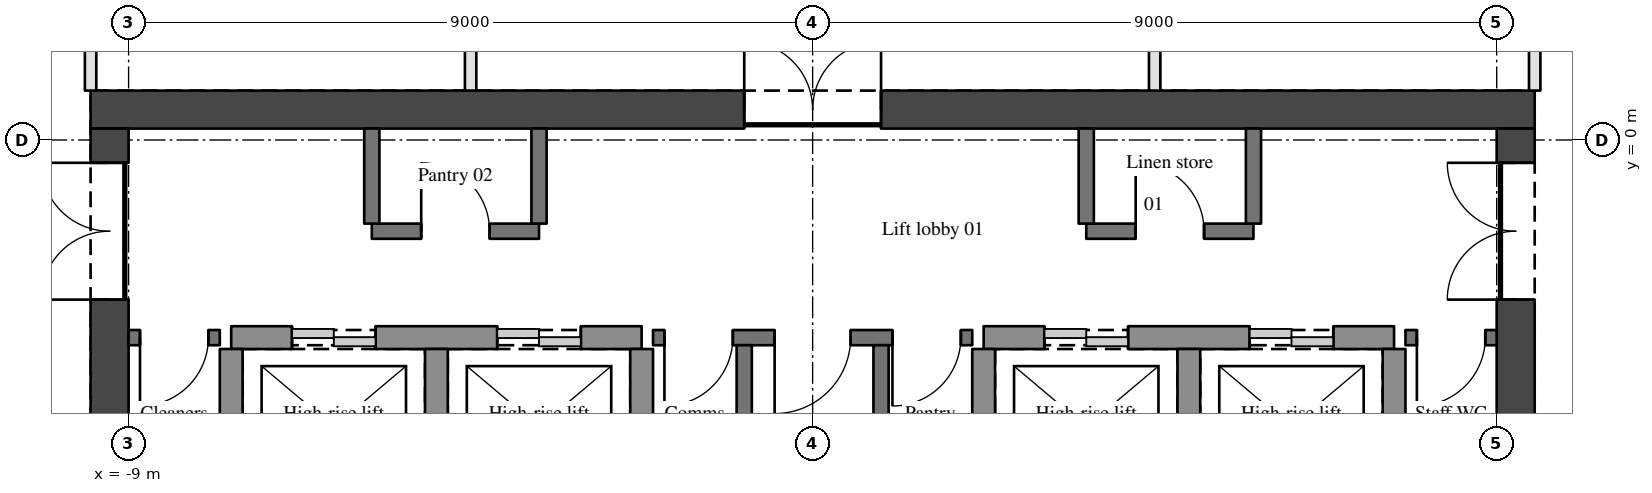
"""IFC4 building model, lengths in metres.
Left out: names, types, materials, properties, quantities, classifications, styles, units other than length and angle.
Written with IfcOpenShell. Run it as: python <this file> out.ifc"""

import sys

from ifc_helpers import new_model, si_unit, direction, frame, frame_2d, origin, place, context, subcontext, project, spatial, rectangle, extrude, element, fill, save


model = new_model("IFC4")
c1 = context("Model", 3, precision=1e-05, world=origin(), true_north=direction((0.0, 1.0)))
c2 = subcontext(c1, "Body", "Model", "MODEL_VIEW")
j1 = project(units=[si_unit("LENGTHUNIT", "METRE"), si_unit("PLANEANGLEUNIT", "RADIAN")], contexts=[c1])
p1 = place(None, origin())
s1 = spatial("IfcSite", under=j1, at=p1, CompositionType="ELEMENT")
p2 = place(p1, origin())
s2 = spatial("IfcBuilding", under=s1, at=p2, CompositionType="ELEMENT")
p3 = place(p2, frame((0.0, 0.0, 172.2)))
s3 = spatial("IfcBuildingStorey", under=s2, at=p3, CompositionType="ELEMENT", Elevation=172.2)
p4 = place(p3, frame((-9.5, 0.4, 0.0), z_axis=(0.0, 0.0, 1.0), x_axis=(1.0, 0.0, 0.0)))
e1 = element("IfcWall", 1, at=p4, inside=s3, PredefinedType="SHEAR", context=c2, shape_type="SweptSolid", body=[
    extrude(rectangle(XDim=19.0, YDim=0.5, at=frame_2d((9.5, 0.0))), origin(), (0.0, 0.0, 1.0), 3.15),
])
p5 = place(p4, frame((8.6, 0.0, 0.0)))
e2 = element("IfcOpeningElement", 2, at=p5, cuts=e1, PredefinedType="OPENING", context=c2, shape_type="SweptSolid", body=[
    extrude(rectangle(XDim=1.8, YDim=2.1, at=frame_2d((0.9, 1.05))), frame((0.0, 0.26, 0.0), z_axis=(0.0, -1.0, 0.0), x_axis=(1.0, 0.0, 0.0)), (0.0, 0.0, 1.0), 0.52),
])
p6 = place(p3, frame((-9.25, -11.5, 0.0), z_axis=(0.0, 0.0, 1.0), x_axis=(0.0, 1.0, 0.0)))
e3 = element("IfcWall", 3, at=p6, inside=s3, PredefinedType="SHEAR", context=c2, shape_type="SweptSolid", body=[
    extrude(rectangle(XDim=11.65, YDim=0.5, at=frame_2d((5.825, 0.0))), origin(), (0.0, 0.0, 1.0), 3.15),
])
p7 = place(p6, frame((9.4, 0.0, 0.0)))
e4 = element("IfcOpeningElement", 4, at=p7, cuts=e3, PredefinedType="OPENING", context=c2, shape_type="SweptSolid", body=[
    extrude(rectangle(XDim=1.8, YDim=2.1, at=frame_2d((0.9, 1.05))), frame((0.0, 0.26, 0.0), z_axis=(0.0, -1.0, 0.0), x_axis=(1.0, 0.0, 0.0)), (0.0, 0.0, 1.0), 0.52),
])
p8 = place(p3, frame((9.25, -11.5, 0.0), z_axis=(0.0, 0.0, 1.0), x_axis=(0.0, 1.0, 0.0)))
e5 = element("IfcWall", 5, at=p8, inside=s3, PredefinedType="SHEAR", context=c2, shape_type="SweptSolid", body=[
    extrude(rectangle(XDim=11.65, YDim=0.5, at=frame_2d((5.825, 0.0))), origin(), (0.0, 0.0, 1.0), 3.15),
])
p9 = place(p8, frame((9.4, 0.0, 0.0)))
e6 = element("IfcOpeningElement", 6, at=p9, cuts=e5, PredefinedType="OPENING", context=c2, shape_type="SweptSolid", body=[
    extrude(rectangle(XDim=1.8, YDim=2.1, at=frame_2d((0.9, 1.05))), frame((0.0, 0.26, 0.0), z_axis=(0.0, -1.0, 0.0), x_axis=(1.0, 0.0, 0.0)), (0.0, 0.0, 1.0), 0.52),
])
p10 = place(p3, frame((-7.8, -2.6, 0.0), z_axis=(0.0, 0.0, 1.0), x_axis=(-1.0, 0.0, 0.0)))
e7 = element("IfcWall", 7, at=p10, inside=s3, PredefinedType="SOLIDWALL", context=c2, shape_type="SweptSolid", body=[
    extrude(rectangle(XDim=1.2, YDim=0.2, at=frame_2d((0.6, 0.0))), origin(), (0.0, 0.0, 1.0), 2.85),
])
p11 = place(p10, frame((0.15, 0.0, 0.0)))
e8 = element("IfcOpeningElement", 8, at=p11, cuts=e7, PredefinedType="OPENING", context=c2, shape_type="SweptSolid", body=[
    extrude(rectangle(XDim=0.9, YDim=2.1, at=frame_2d((0.45, 1.05))), frame((0.0, 0.11, 0.0), z_axis=(0.0, -1.0, 0.0), x_axis=(1.0, 0.0, 0.0)), (0.0, 0.0, 1.0), 0.22),
])
p12 = place(p3, frame((-7.65, -2.6, 0.0), z_axis=(0.0, 0.0, 1.0), x_axis=(1.0, 0.0, 0.0)))
e9 = element("IfcWall", 9, at=p12, inside=s3, PredefinedType="SHEAR", context=c2, shape_type="SweptSolid", body=[
    extrude(rectangle(XDim=5.4, YDim=0.3, at=frame_2d((2.7, 0.0))), origin(), (0.0, 0.0, 1.0), 3.15),
])
p13 = place(p12, frame((0.8, 0.0, 0.0)))
e10 = element("IfcOpeningElement", 10, at=p13, cuts=e9, PredefinedType="OPENING", context=c2, shape_type="SweptSolid", body=[
    extrude(rectangle(XDim=1.1, YDim=2.1, at=frame_2d((0.55, 1.05))), frame((0.0, 0.16, 0.0), z_axis=(0.0, -1.0, 0.0), x_axis=(1.0, 0.0, 0.0)), (0.0, 0.0, 1.0), 0.32),
])
p14 = place(p12, frame((3.5, 0.0, 0.0)))
e11 = element("IfcOpeningElement", 11, at=p14, cuts=e9, PredefinedType="OPENING", context=c2, shape_type="SweptSolid", body=[
    extrude(rectangle(XDim=1.1, YDim=2.1, at=frame_2d((0.55, 1.05))), frame((0.0, 0.16, 0.0), z_axis=(0.0, -1.0, 0.0), x_axis=(1.0, 0.0, 0.0)), (0.0, 0.0, 1.0), 0.32),
])
p15 = place(p3, frame((2.1, -2.6, 0.0), z_axis=(0.0, 0.0, 1.0), x_axis=(-1.0, 0.0, 0.0)))
e12 = element("IfcWall", 12, at=p15, inside=s3, PredefinedType="SOLIDWALL", context=c2, shape_type="SweptSolid", body=[
    extrude(rectangle(XDim=4.2, YDim=0.2, at=frame_2d((2.1, 0.0))), origin(), (0.0, 0.0, 1.0), 2.85),
])
p16 = place(p15, frame((1.6, 0.0, 0.0)))
e13 = element("IfcOpeningElement", 13, at=p16, cuts=e12, PredefinedType="OPENING", context=c2, shape_type="SweptSolid", body=[
    extrude(rectangle(XDim=1.0, YDim=2.1, at=frame_2d((0.5, 1.05))), frame((0.0, 0.11, 0.0), z_axis=(0.0, -1.0, 0.0), x_axis=(1.0, 0.0, 0.0)), (0.0, 0.0, 1.0), 0.22),
])
p17 = place(p15, frame((3.15, 0.0, 0.0)))
e14 = element("IfcOpeningElement", 14, at=p17, cuts=e12, PredefinedType="OPENING", context=c2, shape_type="SweptSolid", body=[
    extrude(rectangle(XDim=0.9, YDim=2.1, at=frame_2d((0.45, 1.05))), frame((0.0, 0.11, 0.0), z_axis=(0.0, -1.0, 0.0), x_axis=(1.0, 0.0, 0.0)), (0.0, 0.0, 1.0), 0.22),
])
p18 = place(p15, frame((0.15, 0.0, 0.0)))
e15 = element("IfcOpeningElement", 15, at=p18, cuts=e12, PredefinedType="OPENING", context=c2, shape_type="SweptSolid", body=[
    extrude(rectangle(XDim=0.9, YDim=2.1, at=frame_2d((0.45, 1.05))), frame((0.0, 0.11, 0.0), z_axis=(0.0, -1.0, 0.0), x_axis=(1.0, 0.0, 0.0)), (0.0, 0.0, 1.0), 0.22),
])
p19 = place(p3, frame((2.25, -2.6, 0.0), z_axis=(0.0, 0.0, 1.0), x_axis=(1.0, 0.0, 0.0)))
e16 = element("IfcWall", 16, at=p19, inside=s3, PredefinedType="SHEAR", context=c2, shape_type="SweptSolid", body=[
    extrude(rectangle(XDim=5.4, YDim=0.3, at=frame_2d((2.7, 0.0))), origin(), (0.0, 0.0, 1.0), 3.15),
])
p20 = place(p19, frame((0.8, 0.0, 0.0)))
e17 = element("IfcOpeningElement", 17, at=p20, cuts=e16, PredefinedType="OPENING", context=c2, shape_type="SweptSolid", body=[
    extrude(rectangle(XDim=1.1, YDim=2.1, at=frame_2d((0.55, 1.05))), frame((0.0, 0.16, 0.0), z_axis=(0.0, -1.0, 0.0), x_axis=(1.0, 0.0, 0.0)), (0.0, 0.0, 1.0), 0.32),
])
p21 = place(p19, frame((3.5, 0.0, 0.0)))
e18 = element("IfcOpeningElement", 18, at=p21, cuts=e16, PredefinedType="OPENING", context=c2, shape_type="SweptSolid", body=[
    extrude(rectangle(XDim=1.1, YDim=2.1, at=frame_2d((0.55, 1.05))), frame((0.0, 0.16, 0.0), z_axis=(0.0, -1.0, 0.0), x_axis=(1.0, 0.0, 0.0)), (0.0, 0.0, 1.0), 0.32),
])
p22 = place(p3, frame((9.0, -2.6, 0.0), z_axis=(0.0, 0.0, 1.0), x_axis=(-1.0, 0.0, 0.0)))
e19 = element("IfcWall", 19, at=p22, inside=s3, PredefinedType="SOLIDWALL", context=c2, shape_type="SweptSolid", body=[
    extrude(rectangle(XDim=1.2, YDim=0.2, at=frame_2d((0.6, 0.0))), origin(), (0.0, 0.0, 1.0), 2.85),
])
p23 = place(p22, frame((0.15, 0.0, 0.0)))
e20 = element("IfcOpeningElement", 20, at=p23, cuts=e19, PredefinedType="OPENING", context=c2, shape_type="SweptSolid", body=[
    extrude(rectangle(XDim=0.9, YDim=2.1, at=frame_2d((0.45, 1.05))), frame((0.0, 0.11, 0.0), z_axis=(0.0, -1.0, 0.0), x_axis=(1.0, 0.0, 0.0)), (0.0, 0.0, 1.0), 0.22),
])
p24 = place(p3, frame((-5.8, -1.2, 0.0), z_axis=(0.0, 0.0, 1.0), x_axis=(1.0, 0.0, 0.0)))
e21 = element("IfcWall", 21, at=p24, inside=s3, PredefinedType="SOLIDWALL", context=c2, shape_type="SweptSolid", body=[
    extrude(rectangle(XDim=2.2, YDim=0.2, at=frame_2d((1.1, 0.0))), origin(), (0.0, 0.0, 1.0), 2.85),
])
p25 = place(p24, frame((0.65, 0.0, 0.0)))
e22 = element("IfcOpeningElement", 22, at=p25, cuts=e21, PredefinedType="OPENING", context=c2, shape_type="SweptSolid", body=[
    extrude(rectangle(XDim=0.9, YDim=2.1, at=frame_2d((0.45, 1.05))), frame((0.0, 0.11, 0.0), z_axis=(0.0, -1.0, 0.0), x_axis=(1.0, 0.0, 0.0)), (0.0, 0.0, 1.0), 0.22),
])
p26 = place(p3, frame((3.6, -1.2, 0.0), z_axis=(0.0, 0.0, 1.0), x_axis=(1.0, 0.0, 0.0)))
e23 = element("IfcWall", 23, at=p26, inside=s3, PredefinedType="SOLIDWALL", context=c2, shape_type="SweptSolid", body=[
    extrude(rectangle(XDim=2.2, YDim=0.2, at=frame_2d((1.1, 0.0))), origin(), (0.0, 0.0, 1.0), 2.85),
])
p27 = place(p26, frame((0.65, 0.0, 0.0)))
e24 = element("IfcOpeningElement", 24, at=p27, cuts=e23, PredefinedType="OPENING", context=c2, shape_type="SweptSolid", body=[
    extrude(rectangle(XDim=0.9, YDim=2.1, at=frame_2d((0.45, 1.05))), frame((0.0, 0.11, 0.0), z_axis=(0.0, -1.0, 0.0), x_axis=(1.0, 0.0, 0.0)), (0.0, 0.0, 1.0), 0.22),
])
p28 = place(p3, frame((-9.5, 9.5, 0.0), z_axis=(0.0, 0.0, 1.0), x_axis=(0.0, -1.0, 0.0)))
e25 = element("IfcWall", 25, at=p28, inside=s3, PredefinedType="PARTITIONING", context=c2, shape_type="SweptSolid", body=[
    extrude(rectangle(XDim=8.85, YDim=0.15, at=frame_2d((4.425, 0.0))), origin(), (0.0, 0.0, 1.0), 2.21),
])
p29 = place(p28, frame((6.025, 0.0, 0.0)))
e26 = element("IfcOpeningElement", 26, at=p29, cuts=e25, PredefinedType="OPENING", context=c2, shape_type="SweptSolid", body=[
    extrude(rectangle(XDim=0.9, YDim=2.1, at=frame_2d((0.45, 1.05))), frame((0.0, 0.085, 0.0), z_axis=(0.0, -1.0, 0.0), x_axis=(1.0, 0.0, 0.0)), (0.0, 0.0, 1.0), 0.17),
])
p30 = place(p3, frame((-7.65, -4.8, 0.0), z_axis=(0.0, 0.0, 1.0), x_axis=(0.0, 1.0, 0.0)))
e27 = element("IfcWall", 27, at=p30, inside=s3, PredefinedType="SHEAR", context=c2, shape_type="SweptSolid", body=[
    extrude(rectangle(XDim=2.05, YDim=0.3, at=frame_2d((1.025, 0.0))), origin(), (0.0, 0.0, 1.0), 3.15),
])
p31 = place(p3, frame((-5.8, -1.1, 0.0), z_axis=(0.0, 0.0, 1.0), x_axis=(0.0, 1.0, 0.0)))
e28 = element("IfcWall", 28, at=p31, inside=s3, PredefinedType="SOLIDWALL", context=c2, shape_type="SweptSolid", body=[
    extrude(rectangle(XDim=1.25, YDim=0.2, at=frame_2d((0.625, 0.0))), origin(), (0.0, 0.0, 1.0), 2.85),
])
p32 = place(p3, frame((-4.95, -4.8, 0.0), z_axis=(0.0, 0.0, 1.0), x_axis=(0.0, 1.0, 0.0)))
e29 = element("IfcWall", 29, at=p32, inside=s3, PredefinedType="SHEAR", context=c2, shape_type="SweptSolid", body=[
    extrude(rectangle(XDim=2.05, YDim=0.3, at=frame_2d((1.025, 0.0))), origin(), (0.0, 0.0, 1.0), 3.15),
])
p33 = place(p3, frame((-4.5, 0.65, 0.0), z_axis=(0.0, 0.0, 1.0), x_axis=(0.0, 1.0, 0.0)))
e30 = element("IfcWall", 30, at=p33, inside=s3, PredefinedType="PARTITIONING", context=c2, shape_type="SweptSolid", body=[
    extrude(rectangle(XDim=4.65, YDim=0.15, at=frame_2d((2.325, 0.0))), origin(), (0.0, 0.0, 1.0), 2.21),
])
p34 = place(p3, frame((-3.6, -1.1, 0.0), z_axis=(0.0, 0.0, 1.0), x_axis=(0.0, 1.0, 0.0)))
e31 = element("IfcWall", 31, at=p34, inside=s3, PredefinedType="SOLIDWALL", context=c2, shape_type="SweptSolid", body=[
    extrude(rectangle(XDim=1.25, YDim=0.2, at=frame_2d((0.625, 0.0))), origin(), (0.0, 0.0, 1.0), 2.85),
])
p35 = place(p3, frame((-2.25, -4.8, 0.0), z_axis=(0.0, 0.0, 1.0), x_axis=(0.0, 1.0, 0.0)))
e32 = element("IfcWall", 32, at=p35, inside=s3, PredefinedType="SHEAR", context=c2, shape_type="SweptSolid", body=[
    extrude(rectangle(XDim=2.05, YDim=0.3, at=frame_2d((1.025, 0.0))), origin(), (0.0, 0.0, 1.0), 3.15),
])
for number, where, z_axis, x_axis in (
    (33, (-0.9, -4.85, 0.0), (0.0, 0.0, 1.0), (0.0, 1.0, 0.0)),
    (34, (0.9, -4.85, 0.0), (0.0, 0.0, 1.0), (0.0, 1.0, 0.0)),
):
    element("IfcWall", number, at=place(p3, frame(where, z_axis=z_axis, x_axis=x_axis)), inside=s3, PredefinedType="SOLIDWALL", context=c2, shape_type="SweptSolid", body=[
        extrude(rectangle(XDim=2.15, YDim=0.2, at=frame_2d((1.075, 0.0))), origin(), (0.0, 0.0, 1.0), 2.85),
    ])
p36 = place(p3, frame((2.25, -4.8, 0.0), z_axis=(0.0, 0.0, 1.0), x_axis=(0.0, 1.0, 0.0)))
e35 = element("IfcWall", 35, at=p36, inside=s3, PredefinedType="SHEAR", context=c2, shape_type="SweptSolid", body=[
    extrude(rectangle(XDim=2.05, YDim=0.3, at=frame_2d((1.025, 0.0))), origin(), (0.0, 0.0, 1.0), 3.15),
])
p37 = place(p3, frame((3.6, -1.1, 0.0), z_axis=(0.0, 0.0, 1.0), x_axis=(0.0, 1.0, 0.0)))
e36 = element("IfcWall", 36, at=p37, inside=s3, PredefinedType="SOLIDWALL", context=c2, shape_type="SweptSolid", body=[
    extrude(rectangle(XDim=1.25, YDim=0.2, at=frame_2d((0.625, 0.0))), origin(), (0.0, 0.0, 1.0), 2.85),
])
p38 = place(p3, frame((4.5, 0.65, 0.0), z_axis=(0.0, 0.0, 1.0), x_axis=(0.0, 1.0, 0.0)))
e37 = element("IfcWall", 37, at=p38, inside=s3, PredefinedType="PARTITIONING", context=c2, shape_type="SweptSolid", body=[
    extrude(rectangle(XDim=4.675, YDim=0.15, at=frame_2d((2.337, 0.0))), origin(), (0.0, 0.0, 1.0), 2.21),
])
p39 = place(p3, frame((4.95, -4.8, 0.0), z_axis=(0.0, 0.0, 1.0), x_axis=(0.0, 1.0, 0.0)))
e38 = element("IfcWall", 38, at=p39, inside=s3, PredefinedType="SHEAR", context=c2, shape_type="SweptSolid", body=[
    extrude(rectangle(XDim=2.05, YDim=0.3, at=frame_2d((1.025, 0.0))), origin(), (0.0, 0.0, 1.0), 3.15),
])
p40 = place(p3, frame((5.8, -1.1, 0.0), z_axis=(0.0, 0.0, 1.0), x_axis=(0.0, 1.0, 0.0)))
e39 = element("IfcWall", 39, at=p40, inside=s3, PredefinedType="SOLIDWALL", context=c2, shape_type="SweptSolid", body=[
    extrude(rectangle(XDim=1.25, YDim=0.2, at=frame_2d((0.625, 0.0))), origin(), (0.0, 0.0, 1.0), 2.85),
])
p41 = place(p3, frame((7.65, -4.8, 0.0), z_axis=(0.0, 0.0, 1.0), x_axis=(0.0, 1.0, 0.0)))
e40 = element("IfcWall", 40, at=p41, inside=s3, PredefinedType="SHEAR", context=c2, shape_type="SweptSolid", body=[
    extrude(rectangle(XDim=2.05, YDim=0.3, at=frame_2d((1.025, 0.0))), origin(), (0.0, 0.0, 1.0), 3.15),
])
p42 = place(p3, frame((9.5, 0.65, 0.0), z_axis=(0.0, 0.0, 1.0), x_axis=(0.0, 1.0, 0.0)))
e41 = element("IfcWall", 41, at=p42, inside=s3, PredefinedType="PARTITIONING", context=c2, shape_type="SweptSolid", body=[
    extrude(rectangle(XDim=8.85, YDim=0.15, at=frame_2d((4.425, 0.0))), origin(), (0.0, 0.0, 1.0), 2.21),
])
p43 = place(p7, origin())
e42 = element("IfcDoor", 42, at=p43, inside=s3, OperationType="DOUBLE_DOOR_SINGLE_SWING", PredefinedType="DOOR", context=c2, shape_type="SweptSolid", body=[
    extrude(rectangle(XDim=1.8, YDim=2.1, at=frame_2d((0.9, 1.05))), frame((0.0, 0.025, 0.0), z_axis=(0.0, -1.0, 0.0), x_axis=(1.0, 0.0, 0.0)), (0.0, 0.0, 1.0), 0.05),
])
fill(e4, e42)
p44 = place(p9, origin())
e43 = element("IfcDoor", 43, at=p44, inside=s3, OperationType="DOUBLE_DOOR_SINGLE_SWING", PredefinedType="DOOR", context=c2, shape_type="SweptSolid", body=[
    extrude(rectangle(XDim=1.8, YDim=2.1, at=frame_2d((0.9, 1.05))), frame((0.0, 0.025, 0.0), z_axis=(0.0, -1.0, 0.0), x_axis=(1.0, 0.0, 0.0)), (0.0, 0.0, 1.0), 0.05),
])
fill(e6, e43)
p45 = place(p5, origin())
e44 = element("IfcDoor", 44, at=p45, inside=s3, OperationType="DOUBLE_DOOR_SINGLE_SWING", PredefinedType="DOOR", context=c2, shape_type="SweptSolid", body=[
    extrude(rectangle(XDim=1.8, YDim=2.1, at=frame_2d((0.9, 1.05))), frame((0.0, 0.025, 0.0), z_axis=(0.0, -1.0, 0.0), x_axis=(1.0, 0.0, 0.0)), (0.0, 0.0, 1.0), 0.05),
])
fill(e2, e44)
p46 = place(p16, origin())
e45 = element("IfcDoor", 45, at=p46, inside=s3, OperationType="SINGLE_SWING_RIGHT", PredefinedType="DOOR", context=c2, shape_type="SweptSolid", body=[
    extrude(rectangle(XDim=1.0, YDim=2.1, at=frame_2d((0.5, 1.05))), frame((0.0, 0.025, 0.0), z_axis=(0.0, -1.0, 0.0), x_axis=(1.0, 0.0, 0.0)), (0.0, 0.0, 1.0), 0.05),
])
fill(e13, e45)
p47 = place(p17, origin())
e46 = element("IfcDoor", 46, at=p47, inside=s3, OperationType="SINGLE_SWING_RIGHT", PredefinedType="DOOR", context=c2, shape_type="SweptSolid", body=[
    extrude(rectangle(XDim=0.9, YDim=2.1, at=frame_2d((0.45, 1.05))), frame((0.0, 0.025, 0.0), z_axis=(0.0, -1.0, 0.0), x_axis=(1.0, 0.0, 0.0)), (0.0, 0.0, 1.0), 0.05),
])
fill(e14, e46)
p48 = place(p18, origin())
e47 = element("IfcDoor", 47, at=p48, inside=s3, OperationType="SINGLE_SWING_RIGHT", PredefinedType="DOOR", context=c2, shape_type="SweptSolid", body=[
    extrude(rectangle(XDim=0.9, YDim=2.1, at=frame_2d((0.45, 1.05))), frame((0.0, 0.025, 0.0), z_axis=(0.0, -1.0, 0.0), x_axis=(1.0, 0.0, 0.0)), (0.0, 0.0, 1.0), 0.05),
])
fill(e15, e47)
p49 = place(p23, origin())
e48 = element("IfcDoor", 48, at=p49, inside=s3, OperationType="SINGLE_SWING_RIGHT", PredefinedType="DOOR", context=c2, shape_type="SweptSolid", body=[
    extrude(rectangle(XDim=0.9, YDim=2.1, at=frame_2d((0.45, 1.05))), frame((0.0, 0.025, 0.0), z_axis=(0.0, -1.0, 0.0), x_axis=(1.0, 0.0, 0.0)), (0.0, 0.0, 1.0), 0.05),
])
fill(e20, e48)
p50 = place(p11, origin())
e49 = element("IfcDoor", 49, at=p50, inside=s3, OperationType="SINGLE_SWING_RIGHT", PredefinedType="DOOR", context=c2, shape_type="SweptSolid", body=[
    extrude(rectangle(XDim=0.9, YDim=2.1, at=frame_2d((0.45, 1.05))), frame((0.0, 0.025, 0.0), z_axis=(0.0, -1.0, 0.0), x_axis=(1.0, 0.0, 0.0)), (0.0, 0.0, 1.0), 0.05),
])
fill(e8, e49)
p51 = place(p25, origin())
e50 = element("IfcDoor", 50, at=p51, inside=s3, OperationType="SINGLE_SWING_LEFT", PredefinedType="DOOR", context=c2, shape_type="SweptSolid", body=[
    extrude(rectangle(XDim=0.9, YDim=2.1, at=frame_2d((0.45, 1.05))), frame((0.0, 0.025, 0.0), z_axis=(0.0, -1.0, 0.0), x_axis=(1.0, 0.0, 0.0)), (0.0, 0.0, 1.0), 0.05),
])
fill(e22, e50)
p52 = place(p27, origin())
e51 = element("IfcDoor", 51, at=p52, inside=s3, OperationType="SINGLE_SWING_LEFT", PredefinedType="DOOR", context=c2, shape_type="SweptSolid", body=[
    extrude(rectangle(XDim=0.9, YDim=2.1, at=frame_2d((0.45, 1.05))), frame((0.0, 0.025, 0.0), z_axis=(0.0, -1.0, 0.0), x_axis=(1.0, 0.0, 0.0)), (0.0, 0.0, 1.0), 0.05),
])
fill(e24, e51)
p53 = place(p13, origin())
e52 = element("IfcDoor", 52, at=p53, inside=s3, OperationType="DOUBLE_DOOR_SLIDING", PredefinedType="DOOR", context=c2, shape_type="SweptSolid", body=[
    extrude(rectangle(XDim=1.1, YDim=2.1, at=frame_2d((0.55, 1.05))), frame((0.0, 0.025, 0.0), z_axis=(0.0, -1.0, 0.0), x_axis=(1.0, 0.0, 0.0)), (0.0, 0.0, 1.0), 0.05),
])
fill(e10, e52)
p54 = place(p14, origin())
e53 = element("IfcDoor", 53, at=p54, inside=s3, OperationType="DOUBLE_DOOR_SLIDING", PredefinedType="DOOR", context=c2, shape_type="SweptSolid", body=[
    extrude(rectangle(XDim=1.1, YDim=2.1, at=frame_2d((0.55, 1.05))), frame((0.0, 0.025, 0.0), z_axis=(0.0, -1.0, 0.0), x_axis=(1.0, 0.0, 0.0)), (0.0, 0.0, 1.0), 0.05),
])
fill(e11, e53)
p55 = place(p20, origin())
e54 = element("IfcDoor", 54, at=p55, inside=s3, OperationType="DOUBLE_DOOR_SLIDING", PredefinedType="DOOR", context=c2, shape_type="SweptSolid", body=[
    extrude(rectangle(XDim=1.1, YDim=2.1, at=frame_2d((0.55, 1.05))), frame((0.0, 0.025, 0.0), z_axis=(0.0, -1.0, 0.0), x_axis=(1.0, 0.0, 0.0)), (0.0, 0.0, 1.0), 0.05),
])
fill(e17, e54)
p56 = place(p21, origin())
e55 = element("IfcDoor", 55, at=p56, inside=s3, OperationType="DOUBLE_DOOR_SLIDING", PredefinedType="DOOR", context=c2, shape_type="SweptSolid", body=[
    extrude(rectangle(XDim=1.1, YDim=2.1, at=frame_2d((0.55, 1.05))), frame((0.0, 0.025, 0.0), z_axis=(0.0, -1.0, 0.0), x_axis=(1.0, 0.0, 0.0)), (0.0, 0.0, 1.0), 0.05),
])
fill(e18, e55)
save(model, sys.argv[1])
